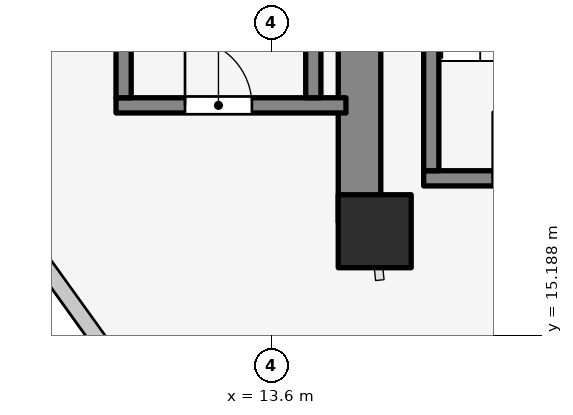
"""IFC4 building model, lengths in metres.
Left out: names, types, materials, properties, quantities, classifications, styles, units other than length and angle.
Written with IfcOpenShell. Run it as: python <this file> out.ifc"""

import sys

from ifc_helpers import new_model, si_unit, direction, frame, frame_2d, origin, origin_2d, place, context, subcontext, project, spatial, rectangle, extrude, element, fill, save


model = new_model("IFC4")
c1 = context("Model", 3, precision=1e-05, world=origin(), true_north=direction((0.0, 1.0)))
c2 = subcontext(c1, "Body", "Model", "MODEL_VIEW")
j1 = project(units=[si_unit("LENGTHUNIT", "METRE"), si_unit("PLANEANGLEUNIT", "RADIAN")], contexts=[c1])
p1 = place(None, origin())
s1 = spatial("IfcSite", under=j1, at=p1, CompositionType="ELEMENT")
p2 = place(p1, origin())
s2 = spatial("IfcBuilding", under=s1, at=p2, CompositionType="ELEMENT")
p3 = place(p2, frame((0.0, 0.0, 129.0)))
s3 = spatial("IfcBuildingStorey", under=s2, at=p3, CompositionType="ELEMENT", Elevation=129.0)
p4 = place(p3, frame((15.05, 17.05, 0.0), z_axis=(0.0, 0.0, 1.0), x_axis=(0.0, 1.0, 0.0)))
e1 = element("IfcWall", 1, at=p4, inside=s3, PredefinedType="SHEAR", context=c2, shape_type="SweptSolid", body=[
    extrude(rectangle(XDim=12.8, YDim=0.7, at=frame_2d((6.4, 0.0))), origin(), (0.0, 0.0, 1.0), 4.2),
])
p5 = place(p3, frame((16.105, 17.77, 0.0), z_axis=(0.0, 0.0, 1.0), x_axis=(1.0, 0.0, 0.0)))
e2 = element("IfcWall", 2, at=p5, inside=s3, PredefinedType="SOLIDWALL", context=c2, shape_type="SweptSolid", body=[
    extrude(rectangle(XDim=3.37, YDim=0.25, at=frame_2d((1.685, 0.0))), origin(), (0.0, 0.0, 1.0), 4.2),
])
p6 = place(p5, frame((1.135, 0.0, 0.0)))
e3 = element("IfcOpeningElement", 3, at=p6, cuts=e2, PredefinedType="OPENING", context=c2, shape_type="SweptSolid", body=[
    extrude(rectangle(XDim=1.1, YDim=2.1, at=frame_2d((0.55, 1.05))), frame((0.0, 0.135, 0.0), z_axis=(0.0, -1.0, 0.0), x_axis=(1.0, 0.0, 0.0)), (0.0, 0.0, 1.0), 0.27),
])
p7 = place(p3, frame((16.23, 17.895, 0.0), z_axis=(0.0, 0.0, 1.0), x_axis=(0.0, 1.0, 0.0)))
e4 = element("IfcWall", 4, at=p7, inside=s3, PredefinedType="SOLIDWALL", context=c2, shape_type="SweptSolid", body=[
    extrude(rectangle(XDim=7.81, YDim=0.25, at=frame_2d((3.905, 0.0))), origin(), (0.0, 0.0, 1.0), 4.2),
])
p8 = place(p3, frame((11.045, 18.97, 0.0), z_axis=(0.0, 0.0, 1.0), x_axis=(1.0, 0.0, 0.0)))
e5 = element("IfcWall", 5, at=p8, inside=s3, PredefinedType="SOLIDWALL", context=c2, shape_type="SweptSolid", body=[
    extrude(rectangle(XDim=3.782, YDim=0.25, at=frame_2d((1.891, 0.0))), origin(), (0.0, 0.0, 1.0), 4.2),
])
p9 = place(p8, frame((1.135, 0.0, 0.0)))
e6 = element("IfcOpeningElement", 6, at=p9, cuts=e5, PredefinedType="OPENING", context=c2, shape_type="SweptSolid", body=[
    extrude(rectangle(XDim=1.1, YDim=2.1, at=frame_2d((0.55, 1.05))), frame((0.0, 0.135, 0.0), z_axis=(0.0, -1.0, 0.0), x_axis=(1.0, 0.0, 0.0)), (0.0, 0.0, 1.0), 0.27),
])
for number, where, z_axis, x_axis in (
    (7, (11.17, 19.095, 0.0), (0.0, 0.0, 1.0), (0.0, 1.0, 0.0)),
    (8, (14.29, 19.095, 0.0), (0.0, 0.0, 1.0), (0.0, 1.0, 0.0)),
):
    element("IfcWall", number, at=place(p3, frame(where, z_axis=z_axis, x_axis=x_axis)), inside=s3, PredefinedType="SOLIDWALL", context=c2, shape_type="SweptSolid", body=[
        extrude(rectangle(XDim=7.81, YDim=0.25, at=frame_2d((3.905, 0.0))), origin(), (0.0, 0.0, 1.0), 4.2),
    ])
p10 = place(p3, frame((15.3, 16.9, 0.0), z_axis=(0.0, 0.0, 1.0), x_axis=(1.0, 0.0, 0.0)))
e9 = element("IfcColumn", 9, at=p10, inside=s3, PredefinedType="COLUMN", context=c2, shape_type="SweptSolid", body=[
    extrude(rectangle(XDim=1.2, YDim=1.2, at=origin_2d()), origin(), (0.0, 0.0, 1.0), 4.2),
])
p11 = place(p3, frame((9.215, 17.26, 0.0), z_axis=(0.0, 0.0, 1.0), x_axis=(0.583704335039, -0.811966285788, 0.0)))
e10 = element("IfcWall", 10, at=p11, inside=s3, PredefinedType="STANDARD", context=c2, shape_type="SweptSolid", body=[
    extrude(rectangle(XDim=4.715, YDim=0.26, at=frame_2d((2.357, 0.0))), origin(), (0.0, 0.0, 1.0), 2.32),
])
p12 = place(p6, origin())
e11 = element("IfcDoor", 11, at=p12, inside=s3, OperationType="SINGLE_SWING_LEFT", PredefinedType="DOOR", context=c2, shape_type="SweptSolid", body=[
    extrude(rectangle(XDim=1.1, YDim=2.1, at=frame_2d((0.55, 1.05))), frame((0.0, 0.025, 0.0), z_axis=(0.0, -1.0, 0.0), x_axis=(1.0, 0.0, 0.0)), (0.0, 0.0, 1.0), 0.05),
])
fill(e3, e11)
p13 = place(p9, origin())
e12 = element("IfcDoor", 12, at=p13, inside=s3, OperationType="SINGLE_SWING_LEFT", PredefinedType="DOOR", context=c2, shape_type="SweptSolid", body=[
    extrude(rectangle(XDim=1.1, YDim=2.1, at=frame_2d((0.55, 1.05))), frame((0.0, 0.025, 0.0), z_axis=(0.0, -1.0, 0.0), x_axis=(1.0, 0.0, 0.0)), (0.0, 0.0, 1.0), 0.05),
])
fill(e6, e12)
save(model, sys.argv[1])
